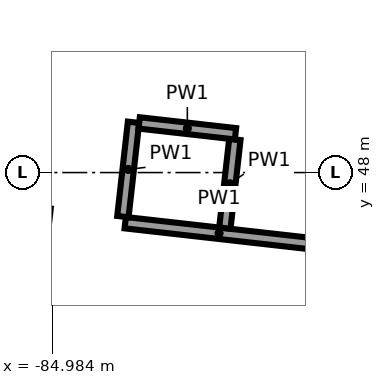
"""IFC4 building model, lengths in metres.
Left out: names, types, materials, properties, quantities, classifications, styles, units other than length and angle.
Written with IfcOpenShell. Run it as: python <this file> out.ifc"""

import sys

from ifc_helpers import new_model, si_unit, direction, frame, frame_2d, origin, place, context, subcontext, project, spatial, rectangle, extrude, element, save


model = new_model("IFC4")
c1 = context("Model", 3, precision=1e-05, world=origin(), true_north=direction((0.0, 1.0)))
c2 = subcontext(c1, "Body", "Model", "MODEL_VIEW")
j1 = project(units=[si_unit("LENGTHUNIT", "METRE"), si_unit("PLANEANGLEUNIT", "RADIAN")], contexts=[c1])
p1 = place(None, origin())
s1 = spatial("IfcSite", under=j1, at=p1, CompositionType="ELEMENT")
p2 = place(p1, origin())
s2 = spatial("IfcBuilding", under=s1, at=p2, CompositionType="ELEMENT")
p3 = place(p2, origin())
s3 = spatial("IfcBuildingStorey", under=s2, at=p3, CompositionType="ELEMENT", Elevation=0.0)
p4 = place(p3, frame((-84.023, 47.341, 0.0), z_axis=(0.0, 0.0, 1.0), x_axis=(0.993701549417, -0.112059049998, 0.0)))
e1 = element("IfcWall", 1, at=p4, inside=s3, PredefinedType="PARTITIONING", context=c2, shape_type="SweptSolid", body=[
    extrude(rectangle(XDim=2.486, YDim=0.15, at=frame_2d((1.243, 0.0))), origin(), (0.0, 0.0, 1.0), 6.15),
])
p5 = place(p3, frame((-83.913, 48.662, 0.0), z_axis=(0.0, 0.0, 1.0), x_axis=(-0.111804424032, -0.993730230378, 0.0)))
e2 = element("IfcWall", 2, at=p5, inside=s3, PredefinedType="PARTITIONING", context=c2, shape_type="SweptSolid", body=[
    extrude(rectangle(XDim=1.249, YDim=0.15, at=frame_2d((0.625, 0.0))), origin(), (0.0, 0.0, 1.0), 6.15),
])
p6 = place(p3, frame((-82.712, 47.269, 0.0), z_axis=(0.0, 0.0, 1.0), x_axis=(0.112097694808, 0.993697190707, 0.0)))
e3 = element("IfcWall", 3, at=p6, inside=s3, PredefinedType="PARTITIONING", context=c2, shape_type="SweptSolid", body=[
    extrude(rectangle(XDim=1.174, YDim=0.15, at=frame_2d((0.587, 0.0))), origin(), (0.0, 0.0, 1.0), 6.15),
])
p7 = place(p3, frame((-82.572, 48.51, 0.0), z_axis=(0.0, 0.0, 1.0), x_axis=(-0.993726262285, 0.111839687257, 0.0)))
e4 = element("IfcWall", 4, at=p7, inside=s3, PredefinedType="PARTITIONING", context=c2, shape_type="SweptSolid", body=[
    extrude(rectangle(XDim=1.275, YDim=0.15, at=frame_2d((0.637, 0.0))), origin(), (0.0, 0.0, 1.0), 6.15),
])
save(model, sys.argv[1])
